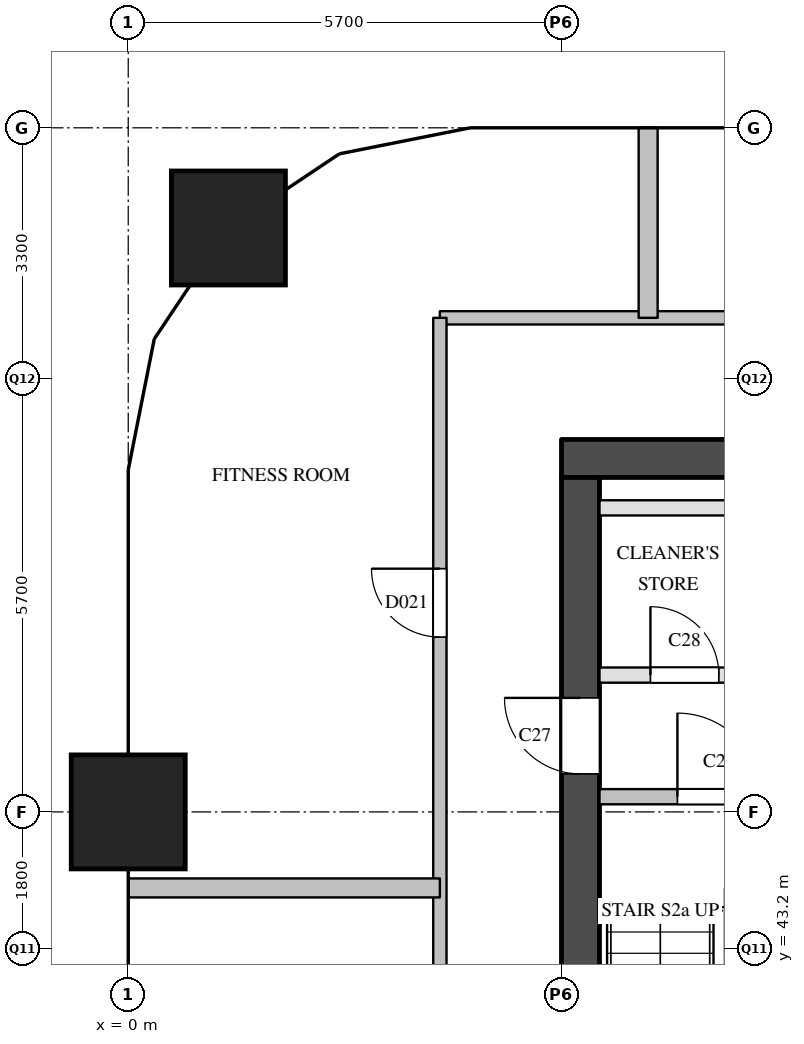
"""IFC4 building model, lengths in metres.
Left out: names, types, materials, properties, quantities, classifications, styles, units other than length and angle.
Written with IfcOpenShell. Run it as: python <this file> out.ifc"""

import sys

from ifc_helpers import new_model, si_unit, direction, frame, frame_2d, origin, origin_2d, place, context, subcontext, project, spatial, rectangle, extrude, element, fill, save


model = new_model("IFC4")
c1 = context("Model", 3, precision=1e-05, world=origin(), true_north=direction((0.0, 1.0)))
c2 = subcontext(c1, "Body", "Model", "MODEL_VIEW")
j1 = project(units=[si_unit("LENGTHUNIT", "METRE"), si_unit("PLANEANGLEUNIT", "RADIAN")], contexts=[c1])
p1 = place(None, origin())
s1 = spatial("IfcSite", under=j1, at=p1, CompositionType="ELEMENT")
p2 = place(p1, origin())
s2 = spatial("IfcBuilding", under=s1, at=p2, CompositionType="ELEMENT")
p3 = place(p2, frame((0.0, 0.0, 173.9)))
s3 = spatial("IfcBuildingStorey", under=s2, at=p3, CompositionType="ELEMENT", Elevation=173.9)
for number, where, z_axis, x_axis in (
    (1, (0.0, 45.0, 0.0), (0.0, 0.0, 1.0), (1.0, 0.0, 0.0)),
    (2, (1.318, 52.682, 0.0), (0.0, 0.0, 1.0), (1.0, 0.0, 0.0)),
):
    element("IfcColumn", number, at=place(p3, frame(where, z_axis=z_axis, x_axis=x_axis)), inside=s3, PredefinedType="COLUMN", context=c2, shape_type="SweptSolid", body=[
        extrude(rectangle(XDim=1.5, YDim=1.5, at=origin_2d()), origin(), (0.0, 0.0, 1.0), 3.9),
    ])
p4 = place(p3, frame((5.7, 49.65, 0.0), z_axis=(0.0, 0.0, 1.0), x_axis=(1.0, 0.0, 0.0)))
e3 = element("IfcWall", 3, at=p4, inside=s3, PredefinedType="SHEAR", context=c2, shape_type="SweptSolid", body=[
    extrude(rectangle(XDim=12.2, YDim=0.5, at=frame_2d((6.1, 0.0))), origin(), (0.0, 0.0, 1.0), 3.6),
])
p5 = place(p3, frame((5.95, 29.1, 0.0), z_axis=(0.0, 0.0, 1.0), x_axis=(0.0, 1.0, 0.0)))
e4 = element("IfcWall", 4, at=p5, inside=s3, PredefinedType="SHEAR", context=c2, shape_type="SweptSolid", body=[
    extrude(rectangle(XDim=20.3, YDim=0.5, at=frame_2d((10.15, 0.0))), origin(), (0.0, 0.0, 1.0), 3.6),
])
p6 = place(p5, frame((3.45, 0.0, 0.0)))
e5 = element("IfcOpeningElement", 5, at=p6, cuts=e4, PredefinedType="OPENING", context=c2, shape_type="SweptSolid", body=[
    extrude(rectangle(XDim=1.0, YDim=2.1, at=frame_2d((0.5, 1.05))), frame((0.0, 0.26, 0.0), z_axis=(0.0, -1.0, 0.0), x_axis=(1.0, 0.0, 0.0)), (0.0, 0.0, 1.0), 0.52),
])
p7 = place(p5, frame((16.4, 0.0, 0.0)))
e6 = element("IfcOpeningElement", 6, at=p7, cuts=e4, PredefinedType="OPENING", context=c2, shape_type="SweptSolid", body=[
    extrude(rectangle(XDim=1.0, YDim=2.1, at=frame_2d((0.5, 1.05))), frame((0.0, 0.26, 0.0), z_axis=(0.0, -1.0, 0.0), x_axis=(1.0, 0.0, 0.0)), (0.0, 0.0, 1.0), 0.52),
])
p8 = place(p3, frame((6.2, 45.2, 0.0), z_axis=(0.0, 0.0, 1.0), x_axis=(1.0, 0.0, 0.0)))
e7 = element("IfcWall", 7, at=p8, inside=s3, PredefinedType="SOLIDWALL", context=c2, shape_type="SweptSolid", body=[
    extrude(rectangle(XDim=6.3, YDim=0.2, at=frame_2d((3.15, 0.0))), origin(), (0.0, 0.0, 1.0), 3.6),
])
p9 = place(p8, frame((1.025, 0.0, 0.0)))
e8 = element("IfcOpeningElement", 8, at=p9, cuts=e7, PredefinedType="OPENING", context=c2, shape_type="SweptSolid", body=[
    extrude(rectangle(XDim=1.1, YDim=2.1, at=frame_2d((0.55, 1.05))), frame((0.0, 0.11, 0.0), z_axis=(0.0, -1.0, 0.0), x_axis=(1.0, 0.0, 0.0)), (0.0, 0.0, 1.0), 0.22),
])
p10 = place(p8, frame((4.175, 0.0, 0.0)))
e9 = element("IfcOpeningElement", 9, at=p10, cuts=e7, PredefinedType="OPENING", context=c2, shape_type="SweptSolid", body=[
    extrude(rectangle(XDim=1.1, YDim=2.1, at=frame_2d((0.55, 1.05))), frame((0.0, 0.11, 0.0), z_axis=(0.0, -1.0, 0.0), x_axis=(1.0, 0.0, 0.0)), (0.0, 0.0, 1.0), 0.22),
])
p11 = place(p3, frame((6.2, 46.8, 0.0), z_axis=(0.0, 0.0, 1.0), x_axis=(1.0, 0.0, 0.0)))
e10 = element("IfcWall", 10, at=p11, inside=s3, PredefinedType="PARTITIONING", context=c2, shape_type="SweptSolid", body=[
    extrude(rectangle(XDim=11.2, YDim=0.2, at=frame_2d((5.6, 0.0))), origin(), (0.0, 0.0, 1.0), 3.6),
])
p12 = place(p11, frame((0.67, 0.0, 0.0)))
e11 = element("IfcOpeningElement", 11, at=p12, cuts=e10, PredefinedType="OPENING", context=c2, shape_type="SweptSolid", body=[
    extrude(rectangle(XDim=0.9, YDim=2.1, at=frame_2d((0.45, 1.05))), frame((0.0, 0.11, 0.0), z_axis=(0.0, -1.0, 0.0), x_axis=(1.0, 0.0, 0.0)), (0.0, 0.0, 1.0), 0.22),
])
p13 = place(p11, frame((6.27, 0.0, 0.0)))
e12 = element("IfcOpeningElement", 12, at=p13, cuts=e10, PredefinedType="OPENING", context=c2, shape_type="SweptSolid", body=[
    extrude(rectangle(XDim=0.9, YDim=2.1, at=frame_2d((0.45, 1.05))), frame((0.0, 0.11, 0.0), z_axis=(0.0, -1.0, 0.0), x_axis=(1.0, 0.0, 0.0)), (0.0, 0.0, 1.0), 0.22),
])
p14 = place(p3, frame((6.2, 49.0, 0.0), z_axis=(0.0, 0.0, 1.0), x_axis=(1.0, 0.0, 0.0)))
e13 = element("IfcWall", 13, at=p14, inside=s3, PredefinedType="PARTITIONING", context=c2, shape_type="SweptSolid", body=[
    extrude(rectangle(XDim=11.2, YDim=0.2, at=frame_2d((5.6, 0.0))), origin(), (0.0, 0.0, 1.0), 3.6),
])
p15 = place(p3, frame((4.1, 51.5, 0.0), z_axis=(0.0, 0.0, 1.0), x_axis=(1.0, 0.0, 0.0)))
e14 = element("IfcWall", 14, at=p15, inside=s3, PredefinedType="PARTITIONING", context=c2, shape_type="SweptSolid", body=[
    extrude(rectangle(XDim=15.4, YDim=0.175, at=frame_2d((7.7, 0.0))), origin(), (0.0, 0.0, 1.0), 3.6),
])
p16 = place(p15, frame((8.212, 0.0, 0.0)))
e15 = element("IfcOpeningElement", 15, at=p16, cuts=e14, PredefinedType="OPENING", context=c2, shape_type="SweptSolid", body=[
    extrude(rectangle(XDim=1.0, YDim=2.1, at=frame_2d((0.5, 1.05))), frame((0.0, 0.097, 0.0), z_axis=(0.0, -1.0, 0.0), x_axis=(1.0, 0.0, 0.0)), (0.0, 0.0, 1.0), 0.195),
])
p17 = place(p3, frame((4.1, 28.5, 0.0), z_axis=(0.0, 0.0, 1.0), x_axis=(0.0, 1.0, 0.0)))
e16 = element("IfcWall", 16, at=p17, inside=s3, PredefinedType="PARTITIONING", context=c2, shape_type="SweptSolid", body=[
    extrude(rectangle(XDim=23.0, YDim=0.175, at=frame_2d((11.5, 0.0))), origin(), (0.0, 0.0, 1.0), 3.6),
])
p18 = place(p17, frame((7.3, 0.0, 0.0)))
e17 = element("IfcOpeningElement", 17, at=p18, cuts=e16, PredefinedType="OPENING", context=c2, shape_type="SweptSolid", body=[
    extrude(rectangle(XDim=0.9, YDim=2.1, at=frame_2d((0.45, 1.05))), frame((0.0, 0.097, 0.0), z_axis=(0.0, -1.0, 0.0), x_axis=(1.0, 0.0, 0.0)), (0.0, 0.0, 1.0), 0.195),
])
p19 = place(p17, frame((18.8, 0.0, 0.0)))
e18 = element("IfcOpeningElement", 18, at=p19, cuts=e16, PredefinedType="OPENING", context=c2, shape_type="SweptSolid", body=[
    extrude(rectangle(XDim=0.9, YDim=2.1, at=frame_2d((0.45, 1.05))), frame((0.0, 0.097, 0.0), z_axis=(0.0, -1.0, 0.0), x_axis=(1.0, 0.0, 0.0)), (0.0, 0.0, 1.0), 0.195),
])
p20 = place(p3, frame((0.0, 44.0, 0.0), z_axis=(0.0, 0.0, 1.0), x_axis=(1.0, 0.0, 0.0)))
e19 = element("IfcWall", 19, at=p20, inside=s3, PredefinedType="PARTITIONING", context=c2, shape_type="SweptSolid", body=[
    extrude(rectangle(XDim=4.1, YDim=0.25, at=frame_2d((2.05, 0.0))), origin(), (0.0, 0.0, 1.0), 2.6),
])
p21 = place(p3, frame((6.84, 51.5, 0.0), z_axis=(0.0, 0.0, 1.0), x_axis=(0.0, 1.0, 0.0)))
e20 = element("IfcWall", 20, at=p21, inside=s3, PredefinedType="PARTITIONING", context=c2, shape_type="SweptSolid", body=[
    extrude(rectangle(XDim=2.5, YDim=0.25, at=frame_2d((1.25, 0.0))), origin(), (0.0, 0.0, 1.0), 2.6),
])
p22 = place(p9, origin())
e21 = element("IfcDoor", 21, at=p22, inside=s3, OperationType="SINGLE_SWING_LEFT", PredefinedType="DOOR", context=c2, shape_type="SweptSolid", body=[
    extrude(rectangle(XDim=1.1, YDim=2.1, at=frame_2d((0.55, 1.05))), frame((0.0, 0.025, 0.0), z_axis=(0.0, -1.0, 0.0), x_axis=(1.0, 0.0, 0.0)), (0.0, 0.0, 1.0), 0.05),
])
fill(e8, e21)
p23 = place(p7, origin())
e22 = element("IfcDoor", 22, at=p23, inside=s3, OperationType="SINGLE_SWING_RIGHT", PredefinedType="DOOR", context=c2, shape_type="SweptSolid", body=[
    extrude(rectangle(XDim=1.0, YDim=2.1, at=frame_2d((0.5, 1.05))), frame((0.0, 0.025, 0.0), z_axis=(0.0, -1.0, 0.0), x_axis=(1.0, 0.0, 0.0)), (0.0, 0.0, 1.0), 0.05),
])
fill(e6, e22)
p24 = place(p12, origin())
e23 = element("IfcDoor", 23, at=p24, inside=s3, OperationType="SINGLE_SWING_LEFT", PredefinedType="DOOR", context=c2, shape_type="SweptSolid", body=[
    extrude(rectangle(XDim=0.9, YDim=2.1, at=frame_2d((0.45, 1.05))), frame((0.0, 0.025, 0.0), z_axis=(0.0, -1.0, 0.0), x_axis=(1.0, 0.0, 0.0)), (0.0, 0.0, 1.0), 0.05),
])
fill(e11, e23)
p25 = place(p19, origin())
e24 = element("IfcDoor", 24, at=p25, inside=s3, OperationType="SINGLE_SWING_RIGHT", PredefinedType="DOOR", context=c2, shape_type="SweptSolid", body=[
    extrude(rectangle(XDim=0.9, YDim=2.1, at=frame_2d((0.45, 1.05))), frame((0.0, 0.025, 0.0), z_axis=(0.0, -1.0, 0.0), x_axis=(1.0, 0.0, 0.0)), (0.0, 0.0, 1.0), 0.05),
])
fill(e18, e24)
save(model, sys.argv[1])
